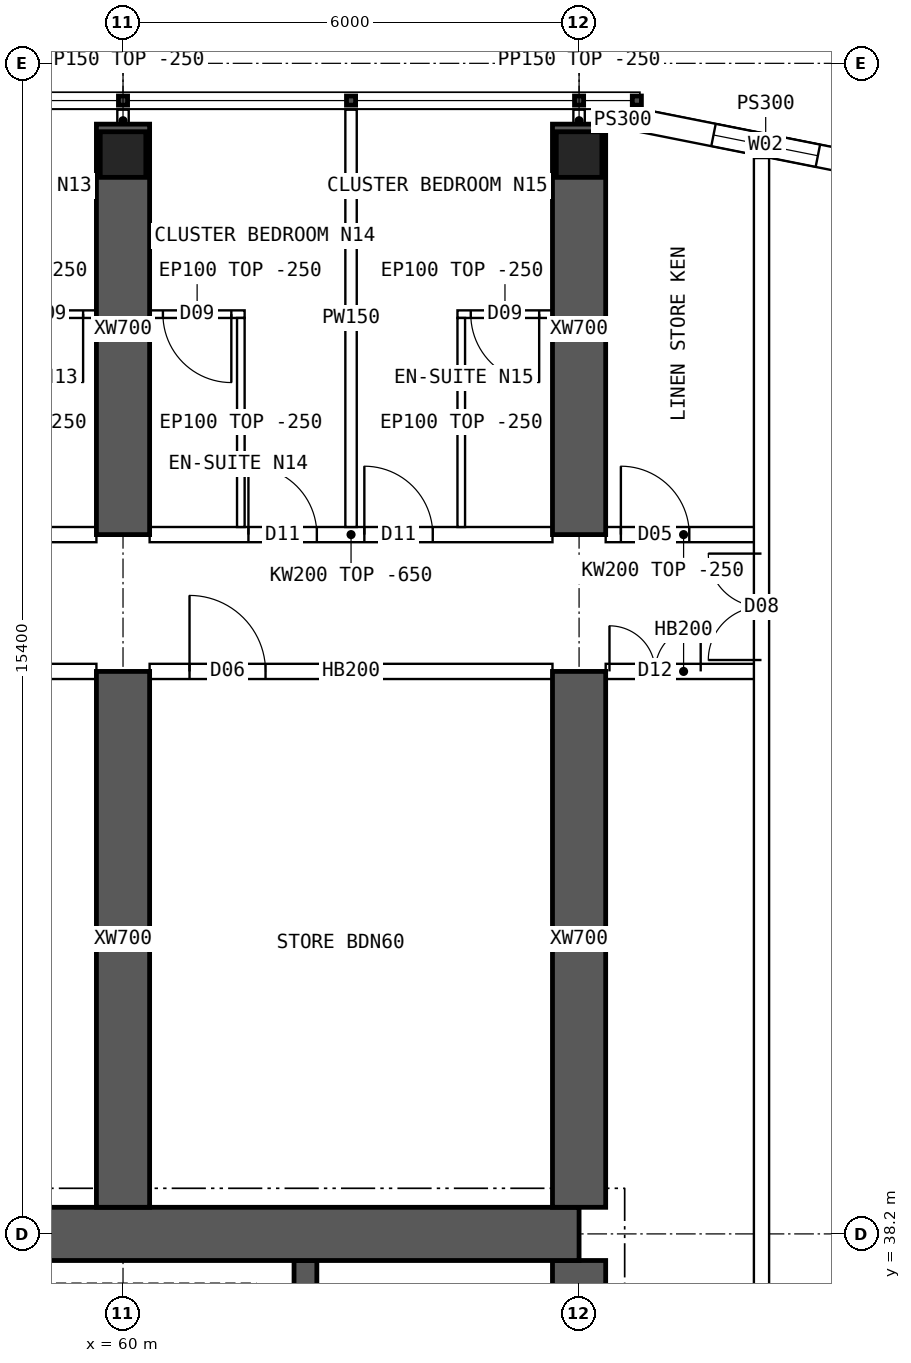
"""IFC4 building model, lengths in metres.
Left out: names, types, materials, properties, quantities, classifications, styles, units other than length and angle.
Written with IfcOpenShell. Run it as: python <this file> out.ifc"""

import sys

from ifc_helpers import new_model, si_unit, direction, frame, frame_2d, origin, origin_2d, place, context, subcontext, project, spatial, polyline, rectangle, hollow_rectangle, outline, extrude, element, fill, save


model = new_model("IFC4")
c1 = context("Model", 3, precision=1e-05, world=origin(), true_north=direction((0.0, 1.0)))
c2 = subcontext(c1, "Body", "Model", "MODEL_VIEW")
j1 = project(units=[si_unit("LENGTHUNIT", "METRE"), si_unit("PLANEANGLEUNIT", "RADIAN")], contexts=[c1])
p1 = place(None, origin())
s1 = spatial("IfcSite", under=j1, at=p1, CompositionType="ELEMENT")
p2 = place(p1, origin())
s2 = spatial("IfcBuilding", under=s1, at=p2, CompositionType="ELEMENT")
p3 = place(p2, frame((0.0, 0.0, 235.3)))
s3 = spatial("IfcBuildingStorey", under=s2, at=p3, CompositionType="ELEMENT", Elevation=235.3)
for number, where, z_axis, x_axis in (
    (1, (60.0, 52.4, 0.0), (0.0, 0.0, 1.0), (1.0, 0.0, 0.0)),
    (2, (66.0, 52.4, 0.0), (0.0, 0.0, 1.0), (1.0, 0.0, 0.0)),
):
    element("IfcColumn", number, at=place(p3, frame(where, z_axis=z_axis, x_axis=x_axis)), inside=s3, PredefinedType="COLUMN", context=c2, shape_type="SweptSolid", body=[
        extrude(hollow_rectangle(XDim=0.6, YDim=0.6, WallThickness=0.06, at=origin_2d()), origin(), (0.0, 0.0, 1.0), 3.75),
    ])
p4 = place(p3, frame((18.0, 38.2, 0.0), z_axis=(0.0, 0.0, 1.0), x_axis=(1.0, 0.0, 0.0)))
e3 = element("IfcWall", 3, at=p4, inside=s3, PredefinedType="SHEAR", context=c2, shape_type="SweptSolid", body=[
    extrude(rectangle(XDim=48.0, YDim=0.7, at=frame_2d((24.0, 0.0))), origin(), (0.0, 0.0, 1.0), 3.75),
])
p5 = place(p3, frame((66.0, 26.15, 0.0), z_axis=(0.0, 0.0, 1.0), x_axis=(0.0, 1.0, 0.0)))
e4 = element("IfcWall", 4, at=p5, inside=s3, PredefinedType="SHEAR", context=c2, shape_type="SweptSolid", body=[
    extrude(rectangle(XDim=11.7, YDim=0.7, at=frame_2d((5.85, 0.0))), origin(), (0.0, 0.0, 1.0), 3.75),
])
p6 = place(p5, frame((5.15, 0.0, 0.0)))
e5 = element("IfcOpeningElement", 5, at=p6, cuts=e4, PredefinedType="OPENING", context=c2, shape_type="SweptSolid", body=[
    extrude(rectangle(XDim=1.2, YDim=2.1, at=frame_2d((0.6, 1.05))), frame((0.0, 0.36, 0.0), z_axis=(0.0, -1.0, 0.0), x_axis=(1.0, 0.0, 0.0)), (0.0, 0.0, 1.0), 0.72),
])
p7 = place(p3, frame((62.4, 34.75, 0.0), z_axis=(0.0, 0.0, 1.0), x_axis=(0.0, 1.0, 0.0)))
e6 = element("IfcWall", 6, at=p7, inside=s3, PredefinedType="SHEAR", context=c2, shape_type="SweptSolid", body=[
    extrude(rectangle(XDim=3.1, YDim=0.3, at=frame_2d((1.55, 0.0))), origin(), (0.0, 0.0, 1.0), 3.75),
])
p8 = place(p3, frame((60.0, 47.4, 0.0), z_axis=(0.0, 0.0, 1.0), x_axis=(0.0, 1.0, 0.0)))
e7 = element("IfcWall", 7, at=p8, inside=s3, PredefinedType="SHEAR", context=c2, shape_type="SweptSolid", body=[
    extrude(rectangle(XDim=5.4, YDim=0.7, at=frame_2d((2.7, 0.0))), origin(), (0.0, 0.0, 1.0), 3.75),
])
p9 = place(p3, frame((60.0, 38.55, 0.0), z_axis=(0.0, 0.0, 1.0), x_axis=(0.0, 1.0, 0.0)))
e8 = element("IfcWall", 8, at=p9, inside=s3, PredefinedType="SHEAR", context=c2, shape_type="SweptSolid", body=[
    extrude(rectangle(XDim=7.05, YDim=0.7, at=frame_2d((3.525, 0.0))), origin(), (0.0, 0.0, 1.0), 3.75),
])
p10 = place(p3, frame((66.0, 47.4, 0.0), z_axis=(0.0, 0.0, 1.0), x_axis=(0.0, 1.0, 0.0)))
e9 = element("IfcWall", 9, at=p10, inside=s3, PredefinedType="SHEAR", context=c2, shape_type="SweptSolid", body=[
    extrude(rectangle(XDim=5.4, YDim=0.7, at=frame_2d((2.7, 0.0))), origin(), (0.0, 0.0, 1.0), 3.75),
])
p11 = place(p3, frame((66.0, 38.55, 0.0), z_axis=(0.0, 0.0, 1.0), x_axis=(0.0, 1.0, 0.0)))
e10 = element("IfcWall", 10, at=p11, inside=s3, PredefinedType="SHEAR", context=c2, shape_type="SweptSolid", body=[
    extrude(rectangle(XDim=7.05, YDim=0.7, at=frame_2d((3.525, 0.0))), origin(), (0.0, 0.0, 1.0), 3.75),
])
p12 = place(p3, frame((70.11, 52.192, 0.0), z_axis=(0.0, 0.0, 1.0), x_axis=(-0.98078325777, 0.195100490205, 0.0)))
e11 = element("IfcWall", 11, at=p12, inside=s3, PredefinedType="SOLIDWALL", context=c2, shape_type="SweptSolid", body=[
    extrude(outline(polyline([(-0.03, -0.15), (3.405, -0.15), (3.345, 0.15), (0.03, 0.15), (-0.03, -0.15)])), origin(), (0.0, 0.0, 1.0), 3.5),
])
p13 = place(p12, frame((0.988, 0.0, 0.9)))
e12 = element("IfcOpeningElement", 12, at=p13, cuts=e11, PredefinedType="OPENING", context=c2, shape_type="SweptSolid", body=[
    extrude(rectangle(XDim=1.4, YDim=1.8, at=frame_2d((0.7, 0.9))), frame((0.0, 0.16, 0.0), z_axis=(0.0, -1.0, 0.0), x_axis=(1.0, 0.0, 0.0)), (0.0, 0.0, 1.0), 0.32),
])
p14 = place(p3, frame((66.8, 52.85, 0.0), z_axis=(0.0, 0.0, 1.0), x_axis=(-1.0, 0.0, 0.0)))
e13 = element("IfcWall", 13, at=p14, inside=s3, PredefinedType="SOLIDWALL", context=c2, shape_type="SweptSolid", body=[
    extrude(rectangle(XDim=0.45, YDim=0.3, at=frame_2d((0.225, 0.0))), origin(), (0.0, 0.0, 1.0), 3.5),
])
p15 = place(p3, frame((54.35, 47.4, 0.0), z_axis=(0.0, 0.0, 1.0), x_axis=(1.0, 0.0, 0.0)))
e14 = element("IfcWall", 14, at=p15, inside=s3, PredefinedType="SOLIDWALL", context=c2, shape_type="SweptSolid", body=[
    extrude(outline(polyline([(0.0, 0.0), (5.3, 0.0), (5.3, 3.1), (0.0, 3.1), (0.0, 0.0)])), frame((0.0, 0.1, 0.0), z_axis=(0.0, -1.0, 0.0), x_axis=(1.0, 0.0, 0.0)), (0.0, 0.0, 1.0), 0.2),
])
p16 = place(p15, frame((1.3, 0.0, 0.0)))
e15 = element("IfcOpeningElement", 15, at=p16, cuts=e14, PredefinedType="OPENING", context=c2, shape_type="SweptSolid", body=[
    extrude(rectangle(XDim=0.9, YDim=2.1, at=frame_2d((0.45, 1.05))), frame((0.0, 0.11, 0.0), z_axis=(0.0, -1.0, 0.0), x_axis=(1.0, 0.0, 0.0)), (0.0, 0.0, 1.0), 0.22),
])
p17 = place(p15, frame((2.825, 0.0, 0.0)))
e16 = element("IfcOpeningElement", 16, at=p17, cuts=e14, PredefinedType="OPENING", context=c2, shape_type="SweptSolid", body=[
    extrude(rectangle(XDim=0.9, YDim=2.1, at=frame_2d((0.45, 1.05))), frame((0.0, 0.11, 0.0), z_axis=(0.0, -1.0, 0.0), x_axis=(1.0, 0.0, 0.0)), (0.0, 0.0, 1.0), 0.22),
])
p18 = place(p3, frame((54.35, 45.6, 0.0), z_axis=(0.0, 0.0, 1.0), x_axis=(1.0, 0.0, 0.0)))
e17 = element("IfcWall", 17, at=p18, inside=s3, PredefinedType="SOLIDWALL", context=c2, shape_type="SweptSolid", body=[
    extrude(rectangle(XDim=5.3, YDim=0.2, at=frame_2d((2.65, 0.0))), origin(), (0.0, 0.0, 1.0), 3.5),
])
p19 = place(p18, frame((0.35, 0.0, 0.0)))
e18 = element("IfcOpeningElement", 18, at=p19, cuts=e17, PredefinedType="OPENING", context=c2, shape_type="SweptSolid", body=[
    extrude(rectangle(XDim=0.9, YDim=2.1, at=frame_2d((0.45, 1.05))), frame((0.0, 0.11, 0.0), z_axis=(0.0, -1.0, 0.0), x_axis=(1.0, 0.0, 0.0)), (0.0, 0.0, 1.0), 0.22),
])
p20 = place(p18, frame((2.435, 0.0, 0.0)))
e19 = element("IfcOpeningElement", 19, at=p20, cuts=e17, PredefinedType="OPENING", context=c2, shape_type="SweptSolid", body=[
    extrude(rectangle(XDim=0.9, YDim=2.1, at=frame_2d((0.45, 1.05))), frame((0.0, 0.11, 0.0), z_axis=(0.0, -1.0, 0.0), x_axis=(1.0, 0.0, 0.0)), (0.0, 0.0, 1.0), 0.22),
])
p21 = place(p3, frame((60.35, 47.4, 0.0), z_axis=(0.0, 0.0, 1.0), x_axis=(1.0, 0.0, 0.0)))
e20 = element("IfcWall", 20, at=p21, inside=s3, PredefinedType="SOLIDWALL", context=c2, shape_type="SweptSolid", body=[
    extrude(outline(polyline([(0.0, 0.0), (5.3, 0.0), (5.3, 3.1), (0.0, 3.1), (0.0, 0.0)])), frame((0.0, 0.1, 0.0), z_axis=(0.0, -1.0, 0.0), x_axis=(1.0, 0.0, 0.0)), (0.0, 0.0, 1.0), 0.2),
])
p22 = place(p21, frame((1.3, 0.0, 0.0)))
e21 = element("IfcOpeningElement", 21, at=p22, cuts=e20, PredefinedType="OPENING", context=c2, shape_type="SweptSolid", body=[
    extrude(rectangle(XDim=0.9, YDim=2.1, at=frame_2d((0.45, 1.05))), frame((0.0, 0.11, 0.0), z_axis=(0.0, -1.0, 0.0), x_axis=(1.0, 0.0, 0.0)), (0.0, 0.0, 1.0), 0.22),
])
p23 = place(p21, frame((2.825, 0.0, 0.0)))
e22 = element("IfcOpeningElement", 22, at=p23, cuts=e20, PredefinedType="OPENING", context=c2, shape_type="SweptSolid", body=[
    extrude(rectangle(XDim=0.9, YDim=2.1, at=frame_2d((0.45, 1.05))), frame((0.0, 0.11, 0.0), z_axis=(0.0, -1.0, 0.0), x_axis=(1.0, 0.0, 0.0)), (0.0, 0.0, 1.0), 0.22),
])
p24 = place(p3, frame((60.35, 45.6, 0.0), z_axis=(0.0, 0.0, 1.0), x_axis=(1.0, 0.0, 0.0)))
e23 = element("IfcWall", 23, at=p24, inside=s3, PredefinedType="SOLIDWALL", context=c2, shape_type="SweptSolid", body=[
    extrude(rectangle(XDim=5.3, YDim=0.2, at=frame_2d((2.65, 0.0))), origin(), (0.0, 0.0, 1.0), 3.5),
])
p25 = place(p24, frame((0.525, 0.0, 0.0)))
e24 = element("IfcOpeningElement", 24, at=p25, cuts=e23, PredefinedType="OPENING", context=c2, shape_type="SweptSolid", body=[
    extrude(rectangle(XDim=1.0, YDim=2.1, at=frame_2d((0.5, 1.05))), frame((0.0, 0.11, 0.0), z_axis=(0.0, -1.0, 0.0), x_axis=(1.0, 0.0, 0.0)), (0.0, 0.0, 1.0), 0.22),
])
p26 = place(p3, frame((66.35, 47.4, 0.0), z_axis=(0.0, 0.0, 1.0), x_axis=(1.0, 0.0, 0.0)))
e25 = element("IfcWall", 25, at=p26, inside=s3, PredefinedType="SOLIDWALL", context=c2, shape_type="SweptSolid", body=[
    extrude(rectangle(XDim=2.05, YDim=0.2, at=frame_2d((1.025, 0.0))), origin(), (0.0, 0.0, 1.0), 3.5),
])
p27 = place(p26, frame((0.2, 0.0, 0.0)))
e26 = element("IfcOpeningElement", 26, at=p27, cuts=e25, PredefinedType="OPENING", context=c2, shape_type="SweptSolid", body=[
    extrude(rectangle(XDim=0.9, YDim=2.1, at=frame_2d((0.45, 1.05))), frame((0.0, 0.11, 0.0), z_axis=(0.0, -1.0, 0.0), x_axis=(1.0, 0.0, 0.0)), (0.0, 0.0, 1.0), 0.22),
])
p28 = place(p3, frame((66.35, 45.6, 0.0), z_axis=(0.0, 0.0, 1.0), x_axis=(1.0, 0.0, 0.0)))
e27 = element("IfcWall", 27, at=p28, inside=s3, PredefinedType="SOLIDWALL", context=c2, shape_type="SweptSolid", body=[
    extrude(rectangle(XDim=2.05, YDim=0.2, at=frame_2d((1.025, 0.0))), origin(), (0.0, 0.0, 1.0), 3.5),
])
p29 = place(p28, frame((0.05, 0.0, 0.0)))
e28 = element("IfcOpeningElement", 28, at=p29, cuts=e27, PredefinedType="OPENING", context=c2, shape_type="SweptSolid", body=[
    extrude(rectangle(XDim=1.2, YDim=2.1, at=frame_2d((0.6, 1.05))), frame((0.0, 0.11, 0.0), z_axis=(0.0, -1.0, 0.0), x_axis=(1.0, 0.0, 0.0)), (0.0, 0.0, 1.0), 0.22),
])
p30 = place(p3, frame((58.4, 50.3, 0.0), z_axis=(0.0, 0.0, 1.0), x_axis=(1.0, 0.0, 0.0)))
e29 = element("IfcWall", 29, at=p30, inside=s3, PredefinedType="PARTITIONING", context=c2, shape_type="SweptSolid", body=[
    extrude(rectangle(XDim=1.25, YDim=0.1, at=frame_2d((0.625, 0.0))), origin(), (0.0, 0.0, 1.0), 3.5),
])
p31 = place(p30, frame((0.175, 0.0, 0.0)))
e30 = element("IfcOpeningElement", 30, at=p31, cuts=e29, PredefinedType="OPENING", context=c2, shape_type="SweptSolid", body=[
    extrude(rectangle(XDim=0.9, YDim=2.1, at=frame_2d((0.45, 1.05))), frame((0.0, 0.06, 0.0), z_axis=(0.0, -1.0, 0.0), x_axis=(1.0, 0.0, 0.0)), (0.0, 0.0, 1.0), 0.12),
])
p32 = place(p3, frame((63.0, 52.99, 0.0), z_axis=(0.0, 0.0, 1.0), x_axis=(0.0, -1.0, 0.0)))
e31 = element("IfcWall", 31, at=p32, inside=s3, PredefinedType="PARTITIONING", context=c2, shape_type="SweptSolid", body=[
    extrude(outline(polyline([(0.0, 0.0), (5.49, 0.0), (5.49, 3.1), (5.442, 3.1), (5.44, 3.5), (0.792, 3.5), (0.79, 3.1), (0.392, 3.1), (0.39, 3.5), (0.0, 3.5), (0.0, 0.0)])), frame((0.0, 0.075, 0.0), z_axis=(0.0, -1.0, 0.0), x_axis=(1.0, 0.0, 0.0)), (0.0, 0.0, 1.0), 0.15),
])
p33 = place(p3, frame((60.35, 50.3, 0.0), z_axis=(0.0, 0.0, 1.0), x_axis=(1.0, 0.0, 0.0)))
e32 = element("IfcWall", 32, at=p33, inside=s3, PredefinedType="PARTITIONING", context=c2, shape_type="SweptSolid", body=[
    extrude(rectangle(XDim=1.25, YDim=0.1, at=frame_2d((0.625, 0.0))), origin(), (0.0, 0.0, 1.0), 3.5),
])
p34 = place(p33, frame((0.175, 0.0, 0.0)))
e33 = element("IfcOpeningElement", 33, at=p34, cuts=e32, PredefinedType="OPENING", context=c2, shape_type="SweptSolid", body=[
    extrude(rectangle(XDim=0.9, YDim=2.1, at=frame_2d((0.45, 1.05))), frame((0.0, 0.06, 0.0), z_axis=(0.0, -1.0, 0.0), x_axis=(1.0, 0.0, 0.0)), (0.0, 0.0, 1.0), 0.12),
])
p35 = place(p3, frame((61.55, 50.25, 0.0), z_axis=(0.0, 0.0, 1.0), x_axis=(0.0, -1.0, 0.0)))
e34 = element("IfcWall", 34, at=p35, inside=s3, PredefinedType="PARTITIONING", context=c2, shape_type="SweptSolid", body=[
    extrude(outline(polyline([(0.0, 0.0), (2.75, 0.0), (2.75, 3.1), (2.702, 3.1), (2.7, 3.5), (0.0, 3.5), (0.0, 0.0)])), frame((0.0, 0.05, 0.0), z_axis=(0.0, -1.0, 0.0), x_axis=(1.0, 0.0, 0.0)), (0.0, 0.0, 1.0), 0.1),
])
p36 = place(p3, frame((64.4, 50.3, 0.0), z_axis=(0.0, 0.0, 1.0), x_axis=(1.0, 0.0, 0.0)))
e35 = element("IfcWall", 35, at=p36, inside=s3, PredefinedType="PARTITIONING", context=c2, shape_type="SweptSolid", body=[
    extrude(rectangle(XDim=1.25, YDim=0.1, at=frame_2d((0.625, 0.0))), origin(), (0.0, 0.0, 1.0), 3.5),
])
p37 = place(p36, frame((0.175, 0.0, 0.0)))
e36 = element("IfcOpeningElement", 36, at=p37, cuts=e35, PredefinedType="OPENING", context=c2, shape_type="SweptSolid", body=[
    extrude(rectangle(XDim=0.9, YDim=2.1, at=frame_2d((0.45, 1.05))), frame((0.0, 0.06, 0.0), z_axis=(0.0, -1.0, 0.0), x_axis=(1.0, 0.0, 0.0)), (0.0, 0.0, 1.0), 0.12),
])
p38 = place(p3, frame((64.45, 50.25, 0.0), z_axis=(0.0, 0.0, 1.0), x_axis=(0.0, -1.0, 0.0)))
e37 = element("IfcWall", 37, at=p38, inside=s3, PredefinedType="PARTITIONING", context=c2, shape_type="SweptSolid", body=[
    extrude(outline(polyline([(0.0, 0.0), (2.75, 0.0), (2.75, 3.1), (2.702, 3.1), (2.7, 3.5), (0.0, 3.5), (0.0, 0.0)])), frame((0.0, 0.05, 0.0), z_axis=(0.0, -1.0, 0.0), x_axis=(1.0, 0.0, 0.0)), (0.0, 0.0, 1.0), 0.1),
])
p39 = place(p3, frame((68.4, 11.646, 0.0), z_axis=(0.0, 0.0, 1.0), x_axis=(0.0, 1.0, 0.0)))
e38 = element("IfcWall", 38, at=p39, inside=s3, PredefinedType="SOLIDWALL", context=c2, shape_type="SweptSolid", body=[
    extrude(rectangle(XDim=40.708, YDim=0.2, at=frame_2d((20.354, 0.0))), origin(), (0.0, 0.0, 1.0), 3.5),
])
p40 = place(p39, frame((5.104, 0.0, 0.0)))
e39 = element("IfcOpeningElement", 39, at=p40, cuts=e38, PredefinedType="OPENING", context=c2, shape_type="SweptSolid", body=[
    extrude(rectangle(XDim=1.4, YDim=2.1, at=frame_2d((0.7, 1.05))), frame((0.0, 0.11, 0.0), z_axis=(0.0, -1.0, 0.0), x_axis=(1.0, 0.0, 0.0)), (0.0, 0.0, 1.0), 0.22),
])
p41 = place(p39, frame((34.104, 0.0, 0.0)))
e40 = element("IfcOpeningElement", 40, at=p41, cuts=e38, PredefinedType="OPENING", context=c2, shape_type="SweptSolid", body=[
    extrude(rectangle(XDim=1.4, YDim=2.1, at=frame_2d((0.7, 1.05))), frame((0.0, 0.11, 0.0), z_axis=(0.0, -1.0, 0.0), x_axis=(1.0, 0.0, 0.0)), (0.0, 0.0, 1.0), 0.22),
])
for number, where, z_axis, x_axis in (
    (41, (60.0, 52.7, 0.0), (0.0, 0.0, 1.0), (0.0, 1.0, 0.0)),
    (42, (66.0, 52.7, 0.0), (0.0, 0.0, 1.0), (0.0, 1.0, 0.0)),
):
    element("IfcWall", number, at=place(p3, frame(where, z_axis=z_axis, x_axis=x_axis)), inside=s3, PredefinedType="PARTITIONING", context=c2, shape_type="SweptSolid", body=[
        extrude(rectangle(XDim=0.29, YDim=0.15, at=frame_2d((0.145, 0.0))), origin(), (0.0, 0.0, 1.0), 3.5),
    ])
p42 = place(p13, origin())
e43 = element("IfcWindow", 43, at=p42, inside=s3, PartitioningType="SINGLE_PANEL", PredefinedType="WINDOW", context=c2, shape_type="SweptSolid", body=[
    extrude(rectangle(XDim=1.4, YDim=1.8, at=frame_2d((0.7, 0.9))), frame((0.0, 0.03, 0.0), z_axis=(0.0, -1.0, 0.0), x_axis=(1.0, 0.0, 0.0)), (0.0, 0.0, 1.0), 0.06),
])
fill(e12, e43)
p43 = place(p29, origin())
e44 = element("IfcDoor", 44, at=p43, inside=s3, OperationType="DOUBLE_DOOR_SINGLE_SWING", PredefinedType="DOOR", context=c2, shape_type="SweptSolid", body=[
    extrude(rectangle(XDim=1.2, YDim=2.1, at=frame_2d((0.6, 1.05))), frame((0.0, 0.025, 0.0), z_axis=(0.0, -1.0, 0.0), x_axis=(1.0, 0.0, 0.0)), (0.0, 0.0, 1.0), 0.05),
])
fill(e28, e44)
p44 = place(p31, origin())
e45 = element("IfcDoor", 45, at=p44, inside=s3, OperationType="SINGLE_SWING_RIGHT", PredefinedType="DOOR", context=c2, shape_type="SweptSolid", body=[
    extrude(rectangle(XDim=0.9, YDim=2.1, at=frame_2d((0.45, 1.05))), frame((0.0, 0.025, 0.0), z_axis=(0.0, -1.0, 0.0), x_axis=(1.0, 0.0, 0.0)), (0.0, 0.0, 1.0), 0.05),
])
fill(e30, e45)
p45 = place(p34, origin())
e46 = element("IfcDoor", 46, at=p45, inside=s3, OperationType="SINGLE_SWING_RIGHT", PredefinedType="DOOR", context=c2, shape_type="SweptSolid", body=[
    extrude(rectangle(XDim=0.9, YDim=2.1, at=frame_2d((0.45, 1.05))), frame((0.0, 0.025, 0.0), z_axis=(0.0, -1.0, 0.0), x_axis=(1.0, 0.0, 0.0)), (0.0, 0.0, 1.0), 0.05),
])
fill(e33, e46)
p46 = place(p22, origin())
e47 = element("IfcDoor", 47, at=p46, inside=s3, OperationType="SINGLE_SWING_LEFT", PredefinedType="DOOR", context=c2, shape_type="SweptSolid", body=[
    extrude(rectangle(XDim=0.9, YDim=2.1, at=frame_2d((0.45, 1.05))), frame((0.0, 0.025, 0.0), z_axis=(0.0, -1.0, 0.0), x_axis=(1.0, 0.0, 0.0)), (0.0, 0.0, 1.0), 0.05),
])
fill(e21, e47)
p47 = place(p37, origin())
e48 = element("IfcDoor", 48, at=p47, inside=s3, OperationType="SINGLE_SWING_RIGHT", PredefinedType="DOOR", context=c2, shape_type="SweptSolid", body=[
    extrude(rectangle(XDim=0.9, YDim=2.1, at=frame_2d((0.45, 1.05))), frame((0.0, 0.025, 0.0), z_axis=(0.0, -1.0, 0.0), x_axis=(1.0, 0.0, 0.0)), (0.0, 0.0, 1.0), 0.05),
])
fill(e36, e48)
p48 = place(p23, origin())
e49 = element("IfcDoor", 49, at=p48, inside=s3, OperationType="SINGLE_SWING_LEFT", PredefinedType="DOOR", context=c2, shape_type="SweptSolid", body=[
    extrude(rectangle(XDim=0.9, YDim=2.1, at=frame_2d((0.45, 1.05))), frame((0.0, 0.025, 0.0), z_axis=(0.0, -1.0, 0.0), x_axis=(1.0, 0.0, 0.0)), (0.0, 0.0, 1.0), 0.05),
])
fill(e22, e49)
p49 = place(p25, origin())
e50 = element("IfcDoor", 50, at=p49, inside=s3, OperationType="SINGLE_SWING_LEFT", PredefinedType="DOOR", context=c2, shape_type="SweptSolid", body=[
    extrude(rectangle(XDim=1.0, YDim=2.1, at=frame_2d((0.5, 1.05))), frame((0.0, 0.025, 0.0), z_axis=(0.0, -1.0, 0.0), x_axis=(1.0, 0.0, 0.0)), (0.0, 0.0, 1.0), 0.05),
])
fill(e24, e50)
p50 = place(p41, origin())
e51 = element("IfcDoor", 51, at=p50, inside=s3, OperationType="DOUBLE_DOOR_SINGLE_SWING", PredefinedType="DOOR", context=c2, shape_type="SweptSolid", body=[
    extrude(rectangle(XDim=1.4, YDim=2.1, at=frame_2d((0.7, 1.05))), frame((0.0, 0.025, 0.0), z_axis=(0.0, -1.0, 0.0), x_axis=(1.0, 0.0, 0.0)), (0.0, 0.0, 1.0), 0.05),
])
fill(e40, e51)
p51 = place(p27, origin())
e52 = element("IfcDoor", 52, at=p51, inside=s3, OperationType="SINGLE_SWING_LEFT", PredefinedType="DOOR", context=c2, shape_type="SweptSolid", body=[
    extrude(rectangle(XDim=0.9, YDim=2.1, at=frame_2d((0.45, 1.05))), frame((0.0, 0.025, 0.0), z_axis=(0.0, -1.0, 0.0), x_axis=(1.0, 0.0, 0.0)), (0.0, 0.0, 1.0), 0.05),
])
fill(e26, e52)
save(model, sys.argv[1])
